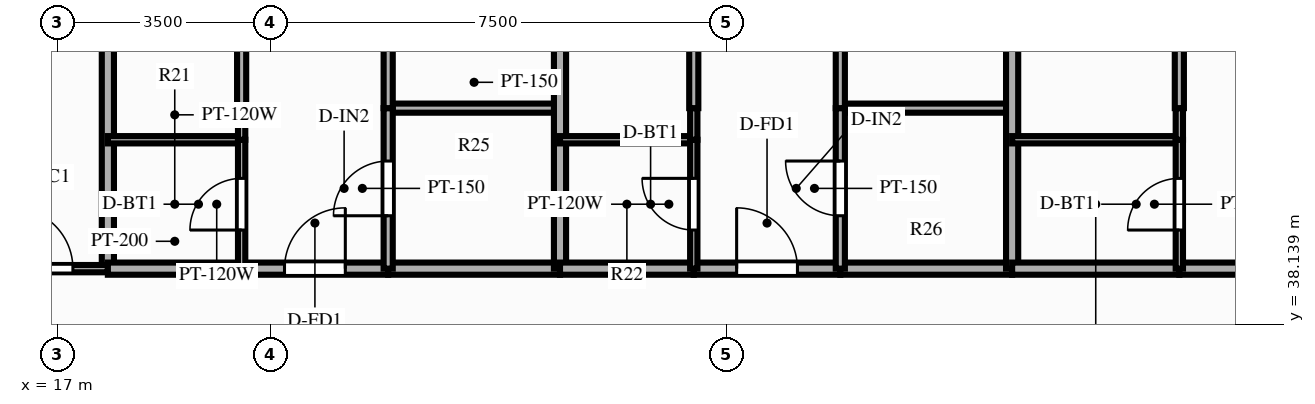
"""IFC4 building model, lengths in metres.
Left out: names, types, materials, properties, quantities, classifications, styles, units other than length and angle.
Written with IfcOpenShell. Run it as: python <this file> out.ifc"""

import sys

from ifc_helpers import new_model, si_unit, direction, frame, frame_2d, origin, place, context, subcontext, project, spatial, rectangle, extrude, source, transform, mapped, element, fill, save


model = new_model("IFC4")
c1 = context("Model", 3, precision=1e-05, world=origin(), true_north=direction((0.0, 1.0)))
c2 = subcontext(c1, "Body", "Model", "MODEL_VIEW")
j1 = project(units=[si_unit("LENGTHUNIT", "METRE"), si_unit("PLANEANGLEUNIT", "RADIAN")], contexts=[c1])
p1 = place(None, origin())
s1 = spatial("IfcSite", under=j1, at=p1, CompositionType="ELEMENT")
p2 = place(p1, origin())
s2 = spatial("IfcBuilding", under=s1, at=p2, CompositionType="ELEMENT")
p3 = place(p2, frame((0.0, 0.0, 46.4)))
s3 = spatial("IfcBuildingStorey", under=s2, at=p3, CompositionType="ELEMENT", Elevation=46.4)
p4 = place(p3, frame((17.83, 39.05, 0.0), z_axis=(0.0, 0.0, 1.0), x_axis=(0.0, 1.0, 0.0)))
e1 = element("IfcWall", 1, at=p4, inside=s3, PredefinedType="PARTITIONING", context=c2, shape_type="SweptSolid", body=[
    extrude(rectangle(XDim=11.8, YDim=0.2, at=frame_2d((5.9, 0.0))), origin(), (0.0, 0.0, 1.0), 2.79),
])
p5 = place(p3, frame((15.68, 39.05, 0.0), z_axis=(0.0, 0.0, 1.0), x_axis=(1.0, 0.0, 0.0)))
e2 = element("IfcWall", 2, at=p5, inside=s3, PredefinedType="PARTITIONING", context=c2, shape_type="SweptSolid", body=[
    extrude(rectangle(XDim=2.15, YDim=0.12, at=frame_2d((1.075, 0.0))), origin(), (0.0, 0.0, 1.0), 2.79),
])
p6 = place(p5, frame((0.575, 0.0, 0.0)))
e3 = element("IfcOpeningElement", 3, at=p6, cuts=e2, PredefinedType="OPENING", context=c2, shape_type="SweptSolid", body=[
    extrude(rectangle(XDim=1.0, YDim=2.1, at=frame_2d((0.5, 1.05))), frame((0.0, 0.072, 0.0), z_axis=(0.0, -1.0, 0.0), x_axis=(1.0, 0.0, 0.0)), (0.0, 0.0, 1.0), 0.144),
])
p7 = place(p3, frame((17.83, 39.05, 0.0), z_axis=(0.0, 0.0, 1.0), x_axis=(1.0, 0.0, 0.0)))
e4 = element("IfcWall", 4, at=p7, inside=s3, PredefinedType="PARTITIONING", context=c2, shape_type="SweptSolid", body=[
    extrude(rectangle(XDim=2.2, YDim=0.2, at=frame_2d((1.1, 0.0))), origin(), (0.0, 0.0, 1.0), 2.79),
])
p8 = place(p3, frame((20.03, 39.05, 0.0), z_axis=(0.0, 0.0, 1.0), x_axis=(1.0, 0.0, 0.0)))
e5 = element("IfcWall", 5, at=p8, inside=s3, PredefinedType="PARTITIONING", context=c2, shape_type="SweptSolid", body=[
    extrude(rectangle(XDim=2.41, YDim=0.2, at=frame_2d((1.205, 0.0))), origin(), (0.0, 0.0, 1.0), 2.79),
])
p9 = place(p8, frame((0.705, 0.0, 0.0)))
e6 = element("IfcOpeningElement", 6, at=p9, cuts=e5, PredefinedType="OPENING", context=c2, shape_type="SweptSolid", body=[
    extrude(rectangle(XDim=1.0, YDim=2.15, at=frame_2d((0.5, 1.075))), frame((0.0, 0.112, 0.0), z_axis=(0.0, -1.0, 0.0), x_axis=(1.0, 0.0, 0.0)), (0.0, 0.0, 1.0), 0.224),
])
p10 = place(p3, frame((22.44, 39.05, 0.0), z_axis=(0.0, 0.0, 1.0), x_axis=(1.0, 0.0, 0.0)))
e7 = element("IfcWall", 7, at=p10, inside=s3, PredefinedType="PARTITIONING", context=c2, shape_type="SweptSolid", body=[
    extrude(rectangle(XDim=2.826, YDim=0.2, at=frame_2d((1.413, 0.0))), origin(), (0.0, 0.0, 1.0), 2.79),
])
p11 = place(p3, frame((17.83, 41.17, 0.0), z_axis=(0.0, 0.0, 1.0), x_axis=(1.0, 0.0, 0.0)))
e8 = element("IfcWall", 8, at=p11, inside=s3, PredefinedType="PARTITIONING", context=c2, shape_type="SweptSolid", body=[
    extrude(rectangle(XDim=2.2, YDim=0.12, at=frame_2d((1.1, 0.0))), origin(), (0.0, 0.0, 1.0), 2.79),
])
p12 = place(p3, frame((22.44, 41.69, 0.0), z_axis=(0.0, 0.0, 1.0), x_axis=(1.0, 0.0, 0.0)))
e9 = element("IfcWall", 9, at=p12, inside=s3, PredefinedType="PARTITIONING", context=c2, shape_type="SweptSolid", body=[
    extrude(rectangle(XDim=2.826, YDim=0.15, at=frame_2d((1.413, 0.0))), origin(), (0.0, 0.0, 1.0), 2.79),
])
p13 = place(p3, frame((20.03, 39.05, 0.0), z_axis=(0.0, 0.0, 1.0), x_axis=(0.0, 1.0, 0.0)))
e10 = element("IfcWall", 10, at=p13, inside=s3, PredefinedType="PARTITIONING", context=c2, shape_type="SweptSolid", body=[
    extrude(rectangle(XDim=2.12, YDim=0.12, at=frame_2d((1.06, 0.0))), origin(), (0.0, 0.0, 1.0), 2.79),
])
p14 = place(p13, frame((0.635, 0.0, 0.0)))
e11 = element("IfcOpeningElement", 11, at=p14, cuts=e10, PredefinedType="OPENING", context=c2, shape_type="SweptSolid", body=[
    extrude(rectangle(XDim=0.85, YDim=2.05, at=frame_2d((0.425, 1.025))), frame((0.0, 0.072, 0.0), z_axis=(0.0, -1.0, 0.0), x_axis=(1.0, 0.0, 0.0)), (0.0, 0.0, 1.0), 0.144),
])
p15 = place(p3, frame((20.03, 41.17, 0.0), z_axis=(0.0, 0.0, 1.0), x_axis=(0.0, 1.0, 0.0)))
e12 = element("IfcWall", 12, at=p15, inside=s3, PredefinedType="PARTITIONING", context=c2, shape_type="SweptSolid", body=[
    extrude(rectangle(XDim=0.52, YDim=0.12, at=frame_2d((0.26, 0.0))), origin(), (0.0, 0.0, 1.0), 2.79),
])
p16 = place(p3, frame((20.03, 41.69, 0.0), z_axis=(0.0, 0.0, 1.0), x_axis=(0.0, 1.0, 0.0)))
e13 = element("IfcWall", 13, at=p16, inside=s3, PredefinedType="PARTITIONING", context=c2, shape_type="SweptSolid", body=[
    extrude(rectangle(XDim=9.16, YDim=0.15, at=frame_2d((4.58, 0.0))), origin(), (0.0, 0.0, 1.0), 2.79),
])
p17 = place(p16, frame((3.806, 0.0, 0.0)))
e14 = element("IfcOpeningElement", 14, at=p17, cuts=e13, PredefinedType="OPENING", context=c2, shape_type="SweptSolid", body=[
    extrude(rectangle(XDim=0.9, YDim=2.1, at=frame_2d((0.45, 1.05))), frame((0.0, 0.087, 0.0), z_axis=(0.0, -1.0, 0.0), x_axis=(1.0, 0.0, 0.0)), (0.0, 0.0, 1.0), 0.174),
])
p18 = place(p3, frame((22.44, 39.05, 0.0), z_axis=(0.0, 0.0, 1.0), x_axis=(0.0, 1.0, 0.0)))
e15 = element("IfcWall", 15, at=p18, inside=s3, PredefinedType="PARTITIONING", context=c2, shape_type="SweptSolid", body=[
    extrude(rectangle(XDim=2.64, YDim=0.15, at=frame_2d((1.32, 0.0))), origin(), (0.0, 0.0, 1.0), 2.79),
])
p19 = place(p18, frame((0.87, 0.0, 0.0)))
e16 = element("IfcOpeningElement", 16, at=p19, cuts=e15, PredefinedType="OPENING", context=c2, shape_type="SweptSolid", body=[
    extrude(rectangle(XDim=0.9, YDim=2.1, at=frame_2d((0.45, 1.05))), frame((0.0, 0.087, 0.0), z_axis=(0.0, -1.0, 0.0), x_axis=(1.0, 0.0, 0.0)), (0.0, 0.0, 1.0), 0.174),
])
p20 = place(p3, frame((22.44, 41.69, 0.0), z_axis=(0.0, 0.0, 1.0), x_axis=(0.0, 1.0, 0.0)))
e17 = element("IfcWall", 17, at=p20, inside=s3, PredefinedType="PARTITIONING", context=c2, shape_type="SweptSolid", body=[
    extrude(rectangle(XDim=9.16, YDim=0.15, at=frame_2d((4.58, 0.0))), origin(), (0.0, 0.0, 1.0), 2.79),
])
p21 = place(p20, frame((3.806, 0.0, 0.0)))
e18 = element("IfcOpeningElement", 18, at=p21, cuts=e17, PredefinedType="OPENING", context=c2, shape_type="SweptSolid", body=[
    extrude(rectangle(XDim=0.9, YDim=2.1, at=frame_2d((0.45, 1.05))), frame((0.0, 0.087, 0.0), z_axis=(0.0, -1.0, 0.0), x_axis=(1.0, 0.0, 0.0)), (0.0, 0.0, 1.0), 0.174),
])
p22 = place(p3, frame((25.266, 39.05, 0.0), z_axis=(0.0, 0.0, 1.0), x_axis=(0.0, 1.0, 0.0)))
e19 = element("IfcWall", 19, at=p22, inside=s3, PredefinedType="PARTITIONING", context=c2, shape_type="SweptSolid", body=[
    extrude(rectangle(XDim=11.8, YDim=0.2, at=frame_2d((5.9, 0.0))), origin(), (0.0, 0.0, 1.0), 2.79),
])
p23 = place(p3, frame((25.266, 39.05, 0.0), z_axis=(0.0, 0.0, 1.0), x_axis=(1.0, 0.0, 0.0)))
e20 = element("IfcWall", 20, at=p23, inside=s3, PredefinedType="PARTITIONING", context=c2, shape_type="SweptSolid", body=[
    extrude(rectangle(XDim=2.2, YDim=0.2, at=frame_2d((1.1, 0.0))), origin(), (0.0, 0.0, 1.0), 2.79),
])
p24 = place(p3, frame((27.466, 39.05, 0.0), z_axis=(0.0, 0.0, 1.0), x_axis=(1.0, 0.0, 0.0)))
e21 = element("IfcWall", 21, at=p24, inside=s3, PredefinedType="PARTITIONING", context=c2, shape_type="SweptSolid", body=[
    extrude(rectangle(XDim=2.41, YDim=0.2, at=frame_2d((1.205, 0.0))), origin(), (0.0, 0.0, 1.0), 2.79),
])
p25 = place(p24, frame((0.705, 0.0, 0.0)))
e22 = element("IfcOpeningElement", 22, at=p25, cuts=e21, PredefinedType="OPENING", context=c2, shape_type="SweptSolid", body=[
    extrude(rectangle(XDim=1.0, YDim=2.15, at=frame_2d((0.5, 1.075))), frame((0.0, 0.112, 0.0), z_axis=(0.0, -1.0, 0.0), x_axis=(1.0, 0.0, 0.0)), (0.0, 0.0, 1.0), 0.224),
])
p26 = place(p3, frame((29.876, 39.05, 0.0), z_axis=(0.0, 0.0, 1.0), x_axis=(1.0, 0.0, 0.0)))
e23 = element("IfcWall", 23, at=p26, inside=s3, PredefinedType="PARTITIONING", context=c2, shape_type="SweptSolid", body=[
    extrude(rectangle(XDim=2.825, YDim=0.2, at=frame_2d((1.413, 0.0))), origin(), (0.0, 0.0, 1.0), 2.79),
])
p27 = place(p3, frame((25.266, 41.17, 0.0), z_axis=(0.0, 0.0, 1.0), x_axis=(1.0, 0.0, 0.0)))
e24 = element("IfcWall", 24, at=p27, inside=s3, PredefinedType="PARTITIONING", context=c2, shape_type="SweptSolid", body=[
    extrude(rectangle(XDim=2.2, YDim=0.12, at=frame_2d((1.1, 0.0))), origin(), (0.0, 0.0, 1.0), 2.79),
])
p28 = place(p3, frame((29.876, 41.69, 0.0), z_axis=(0.0, 0.0, 1.0), x_axis=(1.0, 0.0, 0.0)))
e25 = element("IfcWall", 25, at=p28, inside=s3, PredefinedType="PARTITIONING", context=c2, shape_type="SweptSolid", body=[
    extrude(rectangle(XDim=2.825, YDim=0.15, at=frame_2d((1.413, 0.0))), origin(), (0.0, 0.0, 1.0), 2.79),
])
p29 = place(p3, frame((27.466, 39.05, 0.0), z_axis=(0.0, 0.0, 1.0), x_axis=(0.0, 1.0, 0.0)))
e26 = element("IfcWall", 26, at=p29, inside=s3, PredefinedType="PARTITIONING", context=c2, shape_type="SweptSolid", body=[
    extrude(rectangle(XDim=2.12, YDim=0.12, at=frame_2d((1.06, 0.0))), origin(), (0.0, 0.0, 1.0), 2.79),
])
p30 = place(p29, frame((0.635, 0.0, 0.0)))
e27 = element("IfcOpeningElement", 27, at=p30, cuts=e26, PredefinedType="OPENING", context=c2, shape_type="SweptSolid", body=[
    extrude(rectangle(XDim=0.85, YDim=2.05, at=frame_2d((0.425, 1.025))), frame((0.0, 0.072, 0.0), z_axis=(0.0, -1.0, 0.0), x_axis=(1.0, 0.0, 0.0)), (0.0, 0.0, 1.0), 0.144),
])
p31 = place(p3, frame((27.466, 41.17, 0.0), z_axis=(0.0, 0.0, 1.0), x_axis=(0.0, 1.0, 0.0)))
e28 = element("IfcWall", 28, at=p31, inside=s3, PredefinedType="PARTITIONING", context=c2, shape_type="SweptSolid", body=[
    extrude(rectangle(XDim=0.52, YDim=0.12, at=frame_2d((0.26, 0.0))), origin(), (0.0, 0.0, 1.0), 2.79),
])
p32 = place(p3, frame((27.466, 41.69, 0.0), z_axis=(0.0, 0.0, 1.0), x_axis=(0.0, 1.0, 0.0)))
e29 = element("IfcWall", 29, at=p32, inside=s3, PredefinedType="PARTITIONING", context=c2, shape_type="SweptSolid", body=[
    extrude(rectangle(XDim=9.16, YDim=0.15, at=frame_2d((4.58, 0.0))), origin(), (0.0, 0.0, 1.0), 2.79),
])
p33 = place(p32, frame((3.806, 0.0, 0.0)))
e30 = element("IfcOpeningElement", 30, at=p33, cuts=e29, PredefinedType="OPENING", context=c2, shape_type="SweptSolid", body=[
    extrude(rectangle(XDim=0.9, YDim=2.1, at=frame_2d((0.45, 1.05))), frame((0.0, 0.087, 0.0), z_axis=(0.0, -1.0, 0.0), x_axis=(1.0, 0.0, 0.0)), (0.0, 0.0, 1.0), 0.174),
])
p34 = place(p3, frame((29.876, 39.05, 0.0), z_axis=(0.0, 0.0, 1.0), x_axis=(0.0, 1.0, 0.0)))
e31 = element("IfcWall", 31, at=p34, inside=s3, PredefinedType="PARTITIONING", context=c2, shape_type="SweptSolid", body=[
    extrude(rectangle(XDim=2.64, YDim=0.15, at=frame_2d((1.32, 0.0))), origin(), (0.0, 0.0, 1.0), 2.79),
])
p35 = place(p34, frame((0.87, 0.0, 0.0)))
e32 = element("IfcOpeningElement", 32, at=p35, cuts=e31, PredefinedType="OPENING", context=c2, shape_type="SweptSolid", body=[
    extrude(rectangle(XDim=0.9, YDim=2.1, at=frame_2d((0.45, 1.05))), frame((0.0, 0.087, 0.0), z_axis=(0.0, -1.0, 0.0), x_axis=(1.0, 0.0, 0.0)), (0.0, 0.0, 1.0), 0.174),
])
p36 = place(p3, frame((29.876, 41.69, 0.0), z_axis=(0.0, 0.0, 1.0), x_axis=(0.0, 1.0, 0.0)))
e33 = element("IfcWall", 33, at=p36, inside=s3, PredefinedType="PARTITIONING", context=c2, shape_type="SweptSolid", body=[
    extrude(rectangle(XDim=9.16, YDim=0.15, at=frame_2d((4.58, 0.0))), origin(), (0.0, 0.0, 1.0), 2.79),
])
p37 = place(p36, frame((3.806, 0.0, 0.0)))
e34 = element("IfcOpeningElement", 34, at=p37, cuts=e33, PredefinedType="OPENING", context=c2, shape_type="SweptSolid", body=[
    extrude(rectangle(XDim=0.9, YDim=2.1, at=frame_2d((0.45, 1.05))), frame((0.0, 0.087, 0.0), z_axis=(0.0, -1.0, 0.0), x_axis=(1.0, 0.0, 0.0)), (0.0, 0.0, 1.0), 0.174),
])
p38 = place(p3, frame((32.701, 39.05, 0.0), z_axis=(0.0, 0.0, 1.0), x_axis=(0.0, 1.0, 0.0)))
e35 = element("IfcWall", 35, at=p38, inside=s3, PredefinedType="PARTITIONING", context=c2, shape_type="SweptSolid", body=[
    extrude(rectangle(XDim=11.8, YDim=0.2, at=frame_2d((5.9, 0.0))), origin(), (0.0, 0.0, 1.0), 2.79),
])
p39 = place(p3, frame((32.701, 39.05, 0.0), z_axis=(0.0, 0.0, 1.0), x_axis=(1.0, 0.0, 0.0)))
e36 = element("IfcWall", 36, at=p39, inside=s3, PredefinedType="PARTITIONING", context=c2, shape_type="SweptSolid", body=[
    extrude(rectangle(XDim=2.75, YDim=0.2, at=frame_2d((1.375, 0.0))), origin(), (0.0, 0.0, 1.0), 2.79),
])
p40 = place(p3, frame((35.451, 39.05, 0.0), z_axis=(0.0, 0.0, 1.0), x_axis=(1.0, 0.0, 0.0)))
e37 = element("IfcWall", 37, at=p40, inside=s3, PredefinedType="PARTITIONING", context=c2, shape_type="SweptSolid", body=[
    extrude(rectangle(XDim=7.724, YDim=0.2, at=frame_2d((3.862, 0.0))), origin(), (0.0, 0.0, 1.0), 2.79),
])
p41 = place(p40, frame((3.362, 0.0, 0.0)))
e38 = element("IfcOpeningElement", 38, at=p41, cuts=e37, PredefinedType="OPENING", context=c2, shape_type="SweptSolid", body=[
    extrude(rectangle(XDim=1.0, YDim=2.15, at=frame_2d((0.5, 1.075))), frame((0.0, 0.112, 0.0), z_axis=(0.0, -1.0, 0.0), x_axis=(1.0, 0.0, 0.0)), (0.0, 0.0, 1.0), 0.224),
])
p42 = place(p3, frame((32.701, 41.17, 0.0), z_axis=(0.0, 0.0, 1.0), x_axis=(1.0, 0.0, 0.0)))
e39 = element("IfcWall", 39, at=p42, inside=s3, PredefinedType="PARTITIONING", context=c2, shape_type="SweptSolid", body=[
    extrude(rectangle(XDim=2.75, YDim=0.12, at=frame_2d((1.375, 0.0))), origin(), (0.0, 0.0, 1.0), 2.79),
])
p43 = place(p3, frame((35.451, 39.05, 0.0), z_axis=(0.0, 0.0, 1.0), x_axis=(0.0, 1.0, 0.0)))
e40 = element("IfcWall", 40, at=p43, inside=s3, PredefinedType="PARTITIONING", context=c2, shape_type="SweptSolid", body=[
    extrude(rectangle(XDim=2.12, YDim=0.12, at=frame_2d((1.06, 0.0))), origin(), (0.0, 0.0, 1.0), 2.79),
])
p44 = place(p43, frame((0.635, 0.0, 0.0)))
e41 = element("IfcOpeningElement", 41, at=p44, cuts=e40, PredefinedType="OPENING", context=c2, shape_type="SweptSolid", body=[
    extrude(rectangle(XDim=0.85, YDim=2.05, at=frame_2d((0.425, 1.025))), frame((0.0, 0.072, 0.0), z_axis=(0.0, -1.0, 0.0), x_axis=(1.0, 0.0, 0.0)), (0.0, 0.0, 1.0), 0.144),
])
p45 = place(p3, frame((35.451, 41.17, 0.0), z_axis=(0.0, 0.0, 1.0), x_axis=(0.0, 1.0, 0.0)))
e42 = element("IfcWall", 42, at=p45, inside=s3, PredefinedType="PARTITIONING", context=c2, shape_type="SweptSolid", body=[
    extrude(rectangle(XDim=0.52, YDim=0.12, at=frame_2d((0.26, 0.0))), origin(), (0.0, 0.0, 1.0), 2.79),
])
p46 = place(p3, frame((35.451, 41.69, 0.0), z_axis=(0.0, 0.0, 1.0), x_axis=(0.0, 1.0, 0.0)))
e43 = element("IfcWall", 43, at=p46, inside=s3, PredefinedType="PARTITIONING", context=c2, shape_type="SweptSolid", body=[
    extrude(rectangle(XDim=9.16, YDim=0.15, at=frame_2d((4.58, 0.0))), origin(), (0.0, 0.0, 1.0), 2.79),
])
p47 = place(p46, frame((3.806, 0.0, 0.0)))
e44 = element("IfcOpeningElement", 44, at=p47, cuts=e43, PredefinedType="OPENING", context=c2, shape_type="SweptSolid", body=[
    extrude(rectangle(XDim=0.9, YDim=2.1, at=frame_2d((0.45, 1.05))), frame((0.0, 0.087, 0.0), z_axis=(0.0, -1.0, 0.0), x_axis=(1.0, 0.0, 0.0)), (0.0, 0.0, 1.0), 0.174),
])
m1 = source(origin(), c2, "Body", "SweptSolid", [
    extrude(rectangle(XDim=1.0, YDim=2.1, at=frame_2d((0.5, 1.05))), frame((0.0, 0.025, 0.0), z_axis=(0.0, -1.0, 0.0), x_axis=(1.0, 0.0, 0.0)), (0.0, 0.0, 1.0), 0.05),
])
p48 = place(p6, origin())
e45 = element("IfcDoor", 45, at=p48, inside=s3, OperationType="SINGLE_SWING_LEFT", PredefinedType="DOOR", context=c2, shape_type="MappedRepresentation", body=[
    mapped(m1, transform((0.0, 0.0, 0.0), scale=1.0)),
])
fill(e3, e45)
m2 = source(origin(), c2, "Body", "SweptSolid", [
    extrude(rectangle(XDim=1.0, YDim=2.15, at=frame_2d((0.5, 1.075))), frame((0.0, 0.025, 0.0), z_axis=(0.0, -1.0, 0.0), x_axis=(1.0, 0.0, 0.0)), (0.0, 0.0, 1.0), 0.05),
])
p49 = place(p9, origin())
e46 = element("IfcDoor", 46, at=p49, inside=s3, OperationType="SINGLE_SWING_RIGHT", PredefinedType="DOOR", context=c2, shape_type="MappedRepresentation", body=[
    mapped(m2, transform((0.0, 0.0, 0.0), scale=1.0)),
])
fill(e6, e46)
m3 = source(origin(), c2, "Body", "SweptSolid", [
    extrude(rectangle(XDim=0.85, YDim=2.05, at=frame_2d((0.425, 1.025))), frame((0.0, 0.025, 0.0), z_axis=(0.0, -1.0, 0.0), x_axis=(1.0, 0.0, 0.0)), (0.0, 0.0, 1.0), 0.05),
])
p50 = place(p14, origin())
e47 = element("IfcDoor", 47, at=p50, inside=s3, OperationType="SINGLE_SWING_LEFT", PredefinedType="DOOR", context=c2, shape_type="MappedRepresentation", body=[
    mapped(m3, transform((0.0, 0.0, 0.0), scale=1.0)),
])
fill(e11, e47)
m4 = source(origin(), c2, "Body", "SweptSolid", [
    extrude(rectangle(XDim=0.9, YDim=2.1, at=frame_2d((0.45, 1.05))), frame((0.0, 0.025, 0.0), z_axis=(0.0, -1.0, 0.0), x_axis=(1.0, 0.0, 0.0)), (0.0, 0.0, 1.0), 0.05),
])
p51 = place(p19, origin())
e48 = element("IfcDoor", 48, at=p51, inside=s3, OperationType="SINGLE_SWING_LEFT", PredefinedType="DOOR", context=c2, shape_type="MappedRepresentation", body=[
    mapped(m4, transform((0.0, 0.0, 0.0), scale=1.0)),
])
fill(e16, e48)
p52 = place(p25, origin())
e49 = element("IfcDoor", 49, at=p52, inside=s3, OperationType="SINGLE_SWING_LEFT", PredefinedType="DOOR", context=c2, shape_type="MappedRepresentation", body=[
    mapped(m2, transform((0.0, 0.0, 0.0), scale=1.0)),
])
fill(e22, e49)
p53 = place(p30, origin())
e50 = element("IfcDoor", 50, at=p53, inside=s3, OperationType="SINGLE_SWING_RIGHT", PredefinedType="DOOR", context=c2, shape_type="MappedRepresentation", body=[
    mapped(m3, transform((0.0, 0.0, 0.0), scale=1.0)),
])
fill(e27, e50)
p54 = place(p35, origin())
e51 = element("IfcDoor", 51, at=p54, inside=s3, OperationType="SINGLE_SWING_RIGHT", PredefinedType="DOOR", context=c2, shape_type="MappedRepresentation", body=[
    mapped(m4, transform((0.0, 0.0, 0.0), scale=1.0)),
])
fill(e32, e51)
p55 = place(p44, origin())
e52 = element("IfcDoor", 52, at=p55, inside=s3, OperationType="SINGLE_SWING_LEFT", PredefinedType="DOOR", context=c2, shape_type="MappedRepresentation", body=[
    mapped(m3, transform((0.0, 0.0, 0.0), scale=1.0)),
])
fill(e41, e52)
save(model, sys.argv[1])
